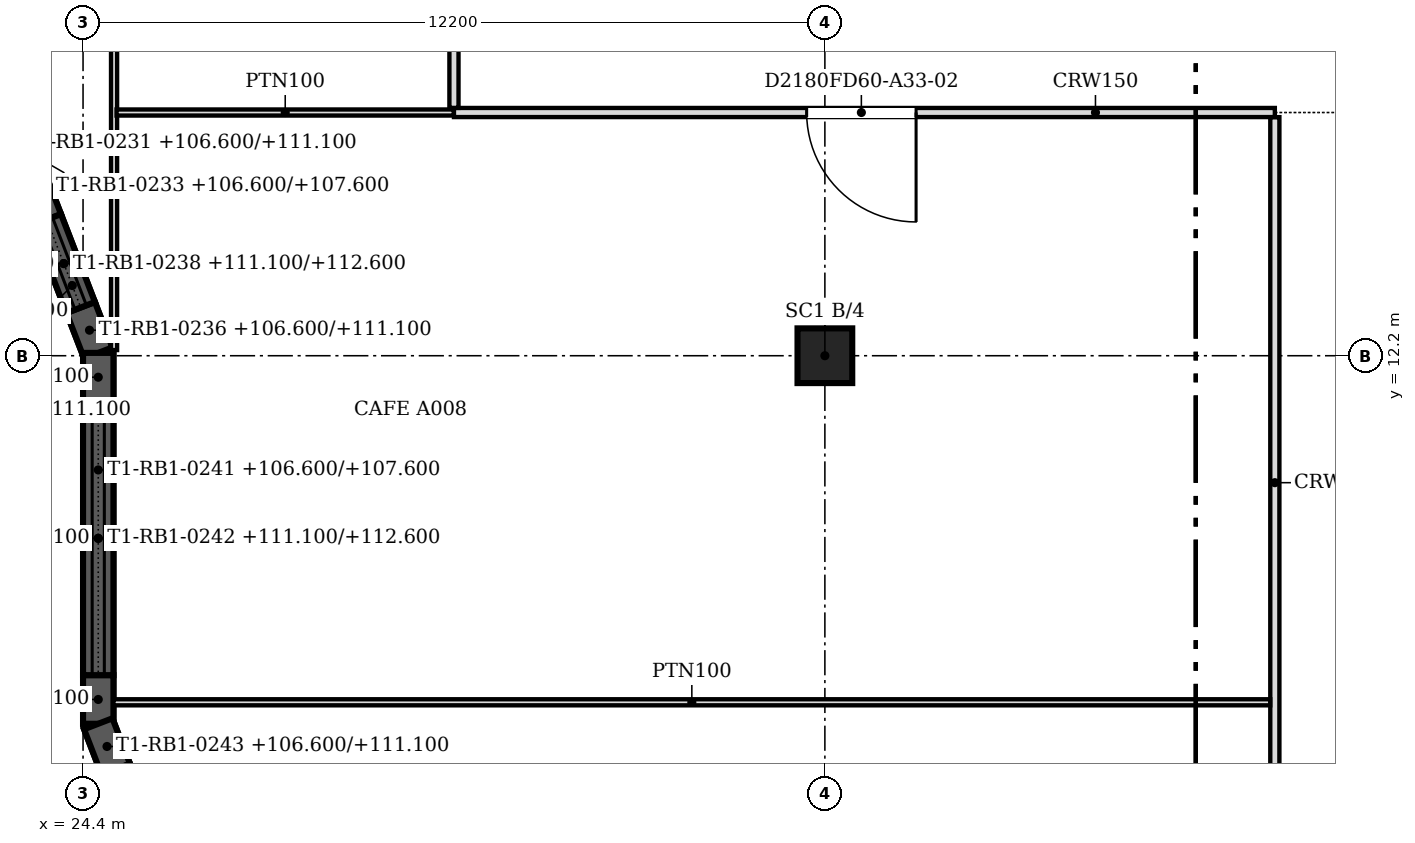
"""IFC4 building model, lengths in metres.
Left out: names, types, materials, properties, quantities, classifications, styles, units other than length and angle.
Written with IfcOpenShell. Run it as: python <this file> out.ifc"""

import sys

from ifc_helpers import new_model, si_unit, direction, frame, frame_2d, origin, origin_2d, place, context, subcontext, project, spatial, polyline, rectangle, outline, extrude, faceted_brep, source, transform, mapped, element, fill, save


model = new_model("IFC4")
c1 = context("Model", 3, precision=1e-05, world=origin(), true_north=direction((0.0, 1.0)))
c2 = subcontext(c1, "Body", "Model", "MODEL_VIEW")
j1 = project(units=[si_unit("LENGTHUNIT", "METRE"), si_unit("PLANEANGLEUNIT", "RADIAN")], contexts=[c1])
p1 = place(None, origin())
s1 = spatial("IfcSite", under=j1, at=p1, CompositionType="ELEMENT")
p2 = place(p1, origin())
s2 = spatial("IfcBuilding", under=s1, at=p2, CompositionType="ELEMENT")
p3 = place(p2, frame((0.0, 0.0, 106.6)))
s3 = spatial("IfcBuildingStorey", under=s2, at=p3, CompositionType="ELEMENT", Elevation=106.6)
p4 = place(p3, frame((36.6, 12.2, 0.0), z_axis=(0.0, 0.0, 1.0), x_axis=(1.0, 0.0, 0.0)))
e1 = element("IfcColumn", 1, at=p4, inside=s3, PredefinedType="COLUMN", context=c2, shape_type="SweptSolid", body=[
    extrude(rectangle(XDim=0.9, YDim=0.9, at=origin_2d()), origin(), (0.0, 0.0, 1.0), 5.8),
])
m1 = source(origin(), c2, "Body", "Brep", [
    faceted_brep([(0.053, -0.25, 0.0), (0.8, -0.25, 0.0), (0.8, -0.25, 4.5), (0.053, -0.25, 4.5), (0.0, 0.25, 4.5), (0.8, 0.25, 4.5), (0.8, 0.25, 0.0), (0.0, 0.25, 0.0), (0.0, 0.0, 0.0), (0.0, 0.0, 4.5)], [[[0, 1, 2, 3]], [[4, 5, 6, 7]], [[7, 6, 1, 0, 8]], [[5, 4, 9, 3, 2]], [[4, 7, 8, 9]], [[8, 0, 3, 9]], [[1, 6, 5, 2]]]),
])
p5 = place(p3, frame((23.517, 15.185, 0.0), z_axis=(0.0, 0.0, 1.0), x_axis=(0.359735468129, -0.933054335486, 0.0)))
e2 = element("IfcWall", 2, at=p5, inside=s3, PredefinedType="SOLIDWALL", context=c2, shape_type="MappedRepresentation", body=[
    mapped(m1, transform((0.0, 0.0, 0.0), scale=1.0)),
])
m2 = source(origin(), c2, "Body", "Brep", [
    faceted_brep([(0.0, -0.25, 0.0), (0.753, -0.25, 0.0), (0.753, -0.25, 4.5), (0.0, -0.25, 4.5), (0.0, 0.25, 4.5), (0.8, 0.25, 4.5), (0.8, 0.25, 0.0), (0.0, 0.25, 0.0), (0.8, 0.0, 0.0), (0.8, 0.0, 4.5)], [[[0, 1, 2, 3]], [[4, 5, 6, 7]], [[7, 6, 8, 1, 0]], [[6, 5, 9, 8]], [[5, 4, 3, 2, 9]], [[4, 7, 0, 3]], [[1, 8, 9, 2]]]),
])
p6 = place(p3, frame((24.362, 12.993, 0.0), z_axis=(0.0, 0.0, 1.0), x_axis=(0.3598379092, -0.93301483327, 0.0)))
e3 = element("IfcWall", 3, at=p6, inside=s3, PredefinedType="SOLIDWALL", context=c2, shape_type="MappedRepresentation", body=[
    mapped(m2, transform((0.0, 0.0, 0.0), scale=1.0)),
])
m3 = source(origin(), c2, "Body", "Brep", [
    faceted_brep([(0.0, -0.25, 0.0), (1.549, -0.25, 0.0), (1.549, -0.25, 1.0), (0.0, -0.25, 1.0), (0.0, 0.25, 1.0), (1.549, 0.25, 1.0), (1.549, 0.25, 0.0), (0.0, 0.25, 0.0)], [[[0, 1, 2, 3]], [[4, 5, 6, 7]], [[7, 6, 1, 0]], [[5, 4, 3, 2]], [[4, 7, 0, 3]], [[1, 6, 5, 2]]]),
])
p7 = place(p3, frame((23.804, 14.438, 0.0), z_axis=(0.0, 0.0, 1.0), x_axis=(0.359897541845, -0.932991832426, 0.0)))
e4 = element("IfcWall", 4, at=p7, inside=s3, PredefinedType="SOLIDWALL", context=c2, shape_type="MappedRepresentation", body=[
    mapped(m3, transform((0.0, 0.0, 0.0), scale=1.0)),
])
m4 = source(origin(), c2, "Body", "Brep", [
    faceted_brep([(0.053, -0.25, 0.0), (3.103, -0.25, 0.0), (3.103, -0.25, 1.5), (0.053, -0.25, 1.5), (0.0, 0.25, 1.5), (3.149, 0.25, 1.5), (3.149, 0.25, 0.0), (0.0, 0.25, 0.0), (3.149, -0.0, 0.0), (0.0, 0.0, 0.0), (3.149, -0.0, 1.5), (0.0, 0.0, 1.5)], [[[0, 1, 2, 3]], [[4, 5, 6, 7]], [[7, 6, 8, 1, 0, 9]], [[6, 5, 10, 8]], [[5, 4, 11, 3, 2, 10]], [[4, 7, 9, 11]], [[9, 0, 3, 11]], [[1, 8, 10, 2]]]),
])
p8 = place(p3, frame((23.517, 15.185, 4.5), z_axis=(0.0, 0.0, 1.0), x_axis=(0.359841220347, -0.933013556246, 0.0)))
e5 = element("IfcWall", 5, at=p8, inside=s3, PredefinedType="SOLIDWALL", context=c2, shape_type="MappedRepresentation", body=[
    mapped(m4, transform((0.0, 0.0, 0.0), scale=1.0)),
])
m5 = source(origin(), c2, "Body", "Brep", [
    faceted_brep([(0.047, -0.25, 0.0), (0.8, -0.25, 0.0), (0.8, -0.25, 4.5), (0.047, -0.25, 4.5), (0.0, 0.25, 4.5), (0.8, 0.25, 4.5), (0.8, 0.25, 0.0), (0.0, 0.25, 0.0), (0.0, 0.0, 0.0), (0.0, 0.0, 4.5)], [[[0, 1, 2, 3]], [[4, 5, 6, 7]], [[7, 6, 1, 0, 8]], [[5, 4, 9, 3, 2]], [[4, 7, 8, 9]], [[8, 0, 3, 9]], [[1, 6, 5, 2]]]),
])
p9 = place(p3, frame((24.65, 12.247, 0.0), z_axis=(0.0, 0.0, 1.0), x_axis=(0.0, -1.0, 0.0)))
e6 = element("IfcWall", 6, at=p9, inside=s3, PredefinedType="SOLIDWALL", context=c2, shape_type="MappedRepresentation", body=[
    mapped(m5, transform((0.0, 0.0, 0.0), scale=1.0)),
])
m6 = source(origin(), c2, "Body", "Brep", [
    faceted_brep([(0.0, -0.25, 0.0), (0.8, -0.25, 0.0), (0.8, -0.25, 4.5), (0.0, -0.25, 4.5), (0.0, 0.25, 4.5), (0.753, 0.25, 4.5), (0.753, 0.25, 0.0), (0.0, 0.25, 0.0), (0.8, -0.0, 0.0), (0.8, -0.0, 4.5)], [[[0, 1, 2, 3]], [[4, 5, 6, 7]], [[7, 6, 8, 1, 0]], [[9, 2, 1, 8]], [[5, 4, 3, 2, 9]], [[4, 7, 0, 3]], [[8, 6, 5, 9]]]),
])
p10 = place(p3, frame((24.65, 6.947, 0.0), z_axis=(0.0, 0.0, 1.0), x_axis=(0.0, -1.0, 0.0)))
e7 = element("IfcWall", 7, at=p10, inside=s3, PredefinedType="SOLIDWALL", context=c2, shape_type="MappedRepresentation", body=[
    mapped(m6, transform((0.0, 0.0, 0.0), scale=1.0)),
])
m7 = source(origin(), c2, "Body", "SweptSolid", [
    extrude(outline(polyline([(0.0, 0.0), (4.5, 0.0), (4.5, 1.0), (0.0, 1.0), (0.0, 0.0)])), frame((0.0, 0.25, 0.0), z_axis=(0.0, -1.0, 0.0), x_axis=(1.0, 0.0, 0.0)), (0.0, 0.0, 1.0), 0.5),
])
p11 = place(p3, frame((24.65, 11.447, 0.0), z_axis=(0.0, 0.0, 1.0), x_axis=(0.0, -1.0, 0.0)))
e8 = element("IfcWall", 8, at=p11, inside=s3, PredefinedType="SOLIDWALL", context=c2, shape_type="MappedRepresentation", body=[
    mapped(m7, transform((0.0, 0.0, 0.0), scale=1.0)),
])
m8 = source(origin(), c2, "Body", "Brep", [
    faceted_brep([(0.047, -0.25, 0.0), (6.1, -0.25, 0.0), (6.1, -0.25, 1.5), (0.047, -0.25, 1.5), (0.0, 0.25, 1.5), (6.053, 0.25, 1.5), (6.053, 0.25, 0.0), (0.0, 0.25, 0.0), (6.1, -0.0, 0.0), (0.0, 0.0, 0.0), (6.1, -0.0, 1.5), (0.0, 0.0, 1.5)], [[[0, 1, 2, 3]], [[4, 5, 6, 7]], [[7, 6, 8, 1, 0, 9]], [[10, 2, 1, 8]], [[5, 4, 11, 3, 2, 10]], [[4, 7, 9, 11]], [[9, 0, 3, 11]], [[8, 6, 5, 10]]]),
])
p12 = place(p3, frame((24.65, 12.247, 4.5), z_axis=(0.0, 0.0, 1.0), x_axis=(0.0, -1.0, 0.0)))
e9 = element("IfcWall", 9, at=p12, inside=s3, PredefinedType="SOLIDWALL", context=c2, shape_type="MappedRepresentation", body=[
    mapped(m8, transform((0.0, 0.0, 0.0), scale=1.0)),
])
m9 = source(origin(), c2, "Body", "Brep", [
    faceted_brep([(0.0, -0.25, 0.0), (0.8, -0.25, 0.0), (0.8, -0.25, 4.5), (0.0, -0.25, 4.5), (0.047, 0.25, 4.5), (0.8, 0.25, 4.5), (0.8, 0.25, 0.0), (0.047, 0.25, 0.0), (0.0, 0.0, 0.0), (0.0, 0.0, 4.5)], [[[0, 1, 2, 3]], [[4, 5, 6, 7]], [[7, 6, 1, 0, 8]], [[5, 4, 9, 3, 2]], [[8, 0, 3, 9]], [[7, 8, 9, 4]], [[1, 6, 5, 2]]]),
])
p13 = place(p3, frame((24.65, 6.146, 0.0), z_axis=(0.0, 0.0, 1.0), x_axis=(0.360103552367, -0.932912338632, 0.0)))
e10 = element("IfcWall", 10, at=p13, inside=s3, PredefinedType="SOLIDWALL", context=c2, shape_type="MappedRepresentation", body=[
    mapped(m9, transform((0.0, 0.0, 0.0), scale=1.0)),
])
m10 = source(origin(), c2, "Body", "Brep", [
    faceted_brep([(0.0, -0.25, 0.0), (2.95, -0.25, 0.0), (2.95, -0.25, 1.5), (0.0, -0.25, 1.5), (0.047, 0.25, 1.5), (2.898, 0.25, 1.5), (2.898, 0.25, 0.0), (0.047, 0.25, 0.0), (2.95, 0.0, 0.0), (0.0, 0.0, 0.0), (2.95, 0.0, 1.5), (0.0, 0.0, 1.5)], [[[0, 1, 2, 3]], [[4, 5, 6, 7]], [[7, 6, 8, 1, 0, 9]], [[10, 2, 1, 8]], [[5, 4, 11, 3, 2, 10]], [[9, 0, 3, 11]], [[7, 9, 11, 4]], [[8, 6, 5, 10]]]),
])
p14 = place(p3, frame((24.65, 6.146, 4.5), z_axis=(0.0, 0.0, 1.0), x_axis=(0.359949242603, -0.932971887438, 0.0)))
e11 = element("IfcWall", 11, at=p14, inside=s3, PredefinedType="SOLIDWALL", context=c2, shape_type="MappedRepresentation", body=[
    mapped(m10, transform((0.0, 0.0, 0.0), scale=1.0)),
])
p15 = place(p3, frame((44.0, 0.5, 0.0), z_axis=(0.0, 0.0, 1.0), x_axis=(0.0, 1.0, 0.0)))
e12 = element("IfcWall", 12, at=p15, inside=s3, PredefinedType="PARTITIONING", context=c2, shape_type="SweptSolid", body=[
    extrude(rectangle(XDim=15.624, YDim=0.15, at=frame_2d((7.812, 0.0))), origin(), (0.0, 0.0, 1.0), 5.167),
])
m11 = source(origin(), c2, "Body", "SweptSolid", [
    extrude(rectangle(XDim=1.2, YDim=2.1, at=frame_2d((0.6, 1.05))), frame((0.0, 0.085, 0.0), z_axis=(0.0, -1.0, 0.0), x_axis=(1.0, 0.0, 0.0)), (0.0, 0.0, 1.0), 0.17),
])
p16 = place(p15, frame((2.4, 0.0, 0.0)))
e13 = element("IfcOpeningElement", 13, at=p16, cuts=e12, PredefinedType="OPENING", context=c2, shape_type="MappedRepresentation", body=[
    mapped(m11, transform((0.0, 0.0, 0.0), scale=1.0)),
])
p17 = place(p3, frame((24.9, 6.5, 0.0), z_axis=(0.0, 0.0, 1.0), x_axis=(1.0, 0.0, 0.0)))
e14 = element("IfcWall", 14, at=p17, inside=s3, PredefinedType="PARTITIONING", context=c2, shape_type="SweptSolid", body=[
    extrude(rectangle(XDim=19.024, YDim=0.1, at=frame_2d((9.512, 0.0))), origin(), (0.0, 0.0, 1.0), 5.167),
])
p18 = place(p3, frame((24.91, 12.293, 0.0), z_axis=(0.0, 0.0, 1.0), x_axis=(0.0, 1.0, 0.0)))
e15 = element("IfcWall", 15, at=p18, inside=s3, PredefinedType="PARTITIONING", context=c2, shape_type="SweptSolid", body=[
    extrude(rectangle(XDim=12.031, YDim=0.1, at=frame_2d((6.015, 0.0))), origin(), (0.0, 0.0, 1.0), 5.167),
])
p19 = place(p3, frame((24.951, 16.2, 0.0), z_axis=(0.0, 0.0, 1.0), x_axis=(1.0, 0.0, 0.0)))
e16 = element("IfcWall", 16, at=p19, inside=s3, PredefinedType="PARTITIONING", context=c2, shape_type="SweptSolid", body=[
    extrude(rectangle(XDim=5.548, YDim=0.1, at=frame_2d((2.774, 0.0))), origin(), (0.0, 0.0, 1.0), 5.167),
])
p20 = place(p3, frame((44.0, 16.2, 0.0), z_axis=(0.0, 0.0, 1.0), x_axis=(-1.0, 0.0, 0.0)))
e17 = element("IfcWall", 17, at=p20, inside=s3, PredefinedType="PARTITIONING", context=c2, shape_type="SweptSolid", body=[
    extrude(rectangle(XDim=13.5, YDim=0.15, at=frame_2d((6.75, 0.0))), origin(), (0.0, 0.0, 1.0), 5.167),
])
m12 = source(origin(), c2, "Body", "SweptSolid", [
    extrude(rectangle(XDim=1.8, YDim=2.1, at=frame_2d((0.9, 1.05))), frame((0.0, 0.085, 0.0), z_axis=(0.0, -1.0, 0.0), x_axis=(1.0, 0.0, 0.0)), (0.0, 0.0, 1.0), 0.17),
])
p21 = place(p20, frame((5.9, 0.0, 0.0)))
e18 = element("IfcOpeningElement", 18, at=p21, cuts=e17, PredefinedType="OPENING", context=c2, shape_type="MappedRepresentation", body=[
    mapped(m12, transform((0.0, 0.0, 0.0), scale=1.0)),
])
p22 = place(p3, frame((30.5, 16.276, 0.0), z_axis=(0.0, 0.0, 1.0), x_axis=(0.0, 1.0, 0.0)))
e19 = element("IfcWall", 19, at=p22, inside=s3, PredefinedType="PARTITIONING", context=c2, shape_type="SweptSolid", body=[
    extrude(rectangle(XDim=5.724, YDim=0.15, at=frame_2d((2.862, 0.0))), origin(), (0.0, 0.0, 1.0), 5.167),
])
m13 = source(origin(), c2, "Body", "SweptSolid", [
    extrude(rectangle(XDim=1.5, YDim=2.1, at=frame_2d((0.75, 1.05))), frame((0.0, 0.085, 0.0), z_axis=(0.0, -1.0, 0.0), x_axis=(1.0, 0.0, 0.0)), (0.0, 0.0, 1.0), 0.17),
])
p23 = place(p22, frame((2.1, 0.0, 0.0)))
e20 = element("IfcOpeningElement", 20, at=p23, cuts=e19, PredefinedType="OPENING", context=c2, shape_type="MappedRepresentation", body=[
    mapped(m13, transform((0.0, 0.0, 0.0), scale=1.0)),
])
m14 = source(origin(), c2, "Body", "SweptSolid", [
    extrude(rectangle(XDim=1.8, YDim=2.1, at=frame_2d((0.9, 1.05))), frame((0.0, 0.025, 0.0), z_axis=(0.0, -1.0, 0.0), x_axis=(1.0, 0.0, 0.0)), (0.0, 0.0, 1.0), 0.05),
])
p24 = place(p21, origin())
e21 = element("IfcDoor", 21, at=p24, inside=s3, OperationType="DOUBLE_DOOR_SINGLE_SWING", PredefinedType="DOOR", context=c2, shape_type="MappedRepresentation", body=[
    mapped(m14, transform((0.0, 0.0, 0.0), scale=1.0)),
])
fill(e18, e21)
save(model, sys.argv[1])
